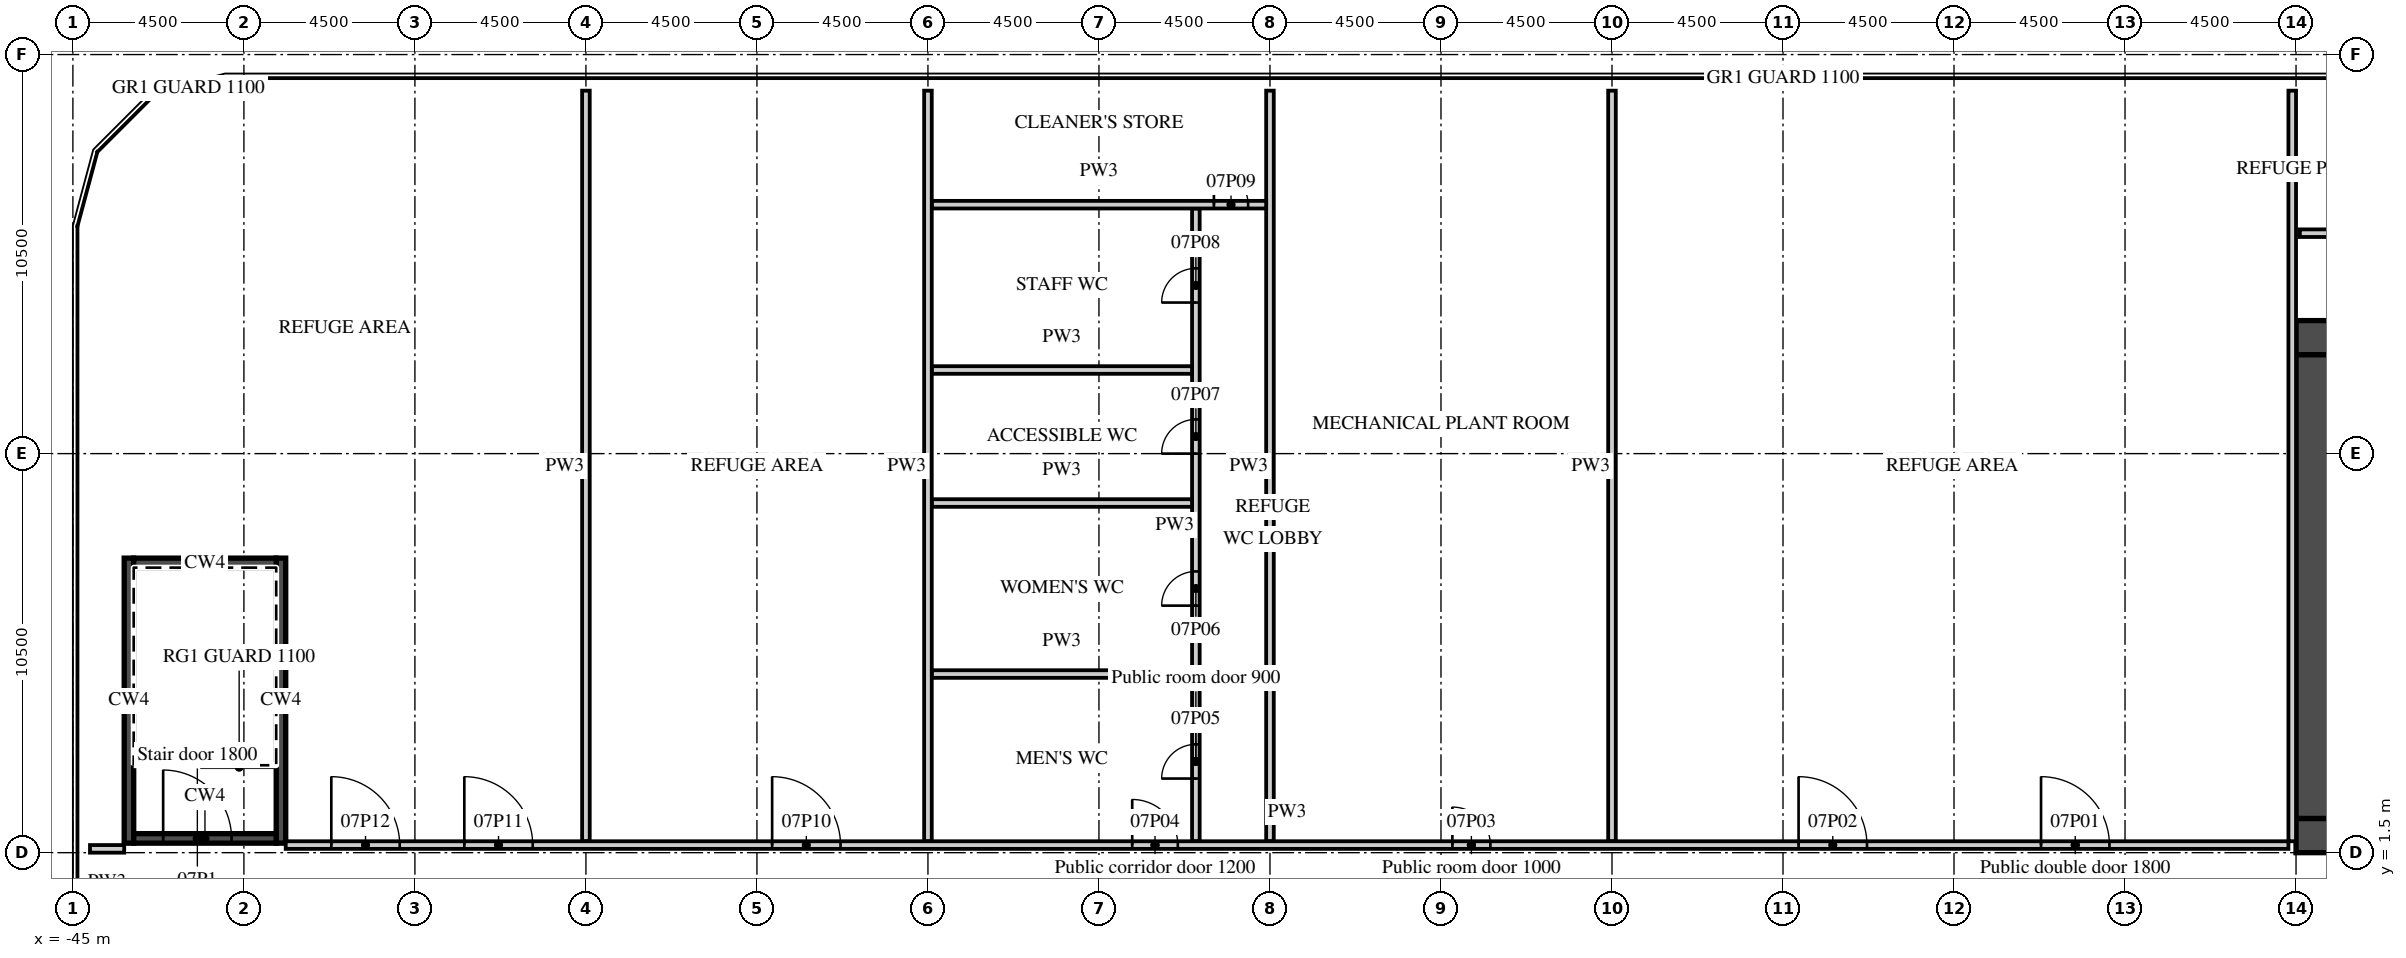
"""IFC4 building model, lengths in metres.
Left out: names, types, materials, properties, quantities, classifications, styles, units other than length and angle.
Written with IfcOpenShell. Run it as: python <this file> out.ifc"""

import sys

from ifc_helpers import new_model, si_unit, direction, frame, frame_2d, origin, place, context, subcontext, project, spatial, rectangle, extrude, element, fill, save


model = new_model("IFC4")
c1 = context("Model", 3, precision=1e-05, world=origin(), true_north=direction((0.0, 1.0)))
c2 = subcontext(c1, "Body", "Model", "MODEL_VIEW")
j1 = project(units=[si_unit("LENGTHUNIT", "METRE"), si_unit("PLANEANGLEUNIT", "RADIAN")], contexts=[c1])
p1 = place(None, origin())
s1 = spatial("IfcSite", under=j1, at=p1, CompositionType="ELEMENT")
p2 = place(p1, origin())
s2 = spatial("IfcBuilding", under=s1, at=p2, CompositionType="ELEMENT")
p3 = place(p2, frame((0.0, 0.0, 47.0)))
s3 = spatial("IfcBuildingStorey", under=s2, at=p3, CompositionType="ELEMENT", Elevation=47.0)
p4 = place(p3, frame((13.5, 1.95, 0.0), z_axis=(0.0, 0.0, 1.0), x_axis=(1.0, 0.0, 0.0)))
e1 = element("IfcWall", 1, at=p4, inside=s3, PredefinedType="SHEAR", context=c2, shape_type="SweptSolid", body=[
    extrude(rectangle(XDim=18.0, YDim=0.9, at=frame_2d((9.0, 0.0))), origin(), (0.0, 0.0, 1.0), 5.6),
])
p5 = place(p4, frame((1.475, 0.0, 0.0)))
e2 = element("IfcOpeningElement", 2, at=p5, cuts=e1, PredefinedType="OPENING", context=c2, shape_type="SweptSolid", body=[
    extrude(rectangle(XDim=1.8, YDim=2.1, at=frame_2d((0.9, 1.05))), frame((0.0, 0.46, 0.0), z_axis=(0.0, -1.0, 0.0), x_axis=(1.0, 0.0, 0.0)), (0.0, 0.0, 1.0), 0.92),
])
p6 = place(p3, frame((13.5, 15.05, 0.0), z_axis=(0.0, 0.0, 1.0), x_axis=(1.0, 0.0, 0.0)))
e3 = element("IfcWall", 3, at=p6, inside=s3, PredefinedType="SHEAR", context=c2, shape_type="SweptSolid", body=[
    extrude(rectangle(XDim=6.8, YDim=0.9, at=frame_2d((3.4, 0.0))), origin(), (0.0, 0.0, 1.0), 5.6),
])
p7 = place(p6, frame((4.725, 0.0, 0.0)))
e4 = element("IfcOpeningElement", 4, at=p7, cuts=e3, PredefinedType="OPENING", context=c2, shape_type="SweptSolid", body=[
    extrude(rectangle(XDim=1.2, YDim=2.1, at=frame_2d((0.6, 1.05))), frame((0.0, 0.46, 0.0), z_axis=(0.0, -1.0, 0.0), x_axis=(1.0, 0.0, 0.0)), (0.0, 0.0, 1.0), 0.92),
])
p8 = place(p3, frame((13.95, 2.4, 0.0), z_axis=(0.0, 0.0, 1.0), x_axis=(0.0, 1.0, 0.0)))
e5 = element("IfcWall", 5, at=p8, inside=s3, PredefinedType="SHEAR", context=c2, shape_type="SweptSolid", body=[
    extrude(rectangle(XDim=12.2, YDim=0.9, at=frame_2d((6.1, 0.0))), origin(), (0.0, 0.0, 1.0), 5.6),
])
p9 = place(p3, frame((13.6, 17.8, 0.0), z_axis=(0.0, 0.0, 1.0), x_axis=(1.0, 0.0, 0.0)))
e6 = element("IfcWall", 6, at=p9, inside=s3, PredefinedType="PARTITIONING", context=c2, shape_type="SweptSolid", body=[
    extrude(rectangle(XDim=30.95, YDim=0.2, at=frame_2d((15.475, 0.0))), origin(), (0.0, 0.0, 1.0), 5.6),
])
p10 = place(p9, frame((15.012, 0.0, 0.0)))
e7 = element("IfcOpeningElement", 7, at=p10, cuts=e6, PredefinedType="OPENING", context=c2, shape_type="SweptSolid", body=[
    extrude(rectangle(XDim=0.9, YDim=2.1, at=frame_2d((0.45, 1.05))), frame((0.0, 0.11, 0.0), z_axis=(0.0, -1.0, 0.0), x_axis=(1.0, 0.0, 0.0)), (0.0, 0.0, 1.0), 0.22),
])
p11 = place(p9, frame((6.712, 0.0, 0.0)))
e8 = element("IfcOpeningElement", 8, at=p11, cuts=e6, PredefinedType="OPENING", context=c2, shape_type="SweptSolid", body=[
    extrude(rectangle(XDim=0.9, YDim=2.1, at=frame_2d((0.45, 1.05))), frame((0.0, 0.11, 0.0), z_axis=(0.0, -1.0, 0.0), x_axis=(1.0, 0.0, 0.0)), (0.0, 0.0, 1.0), 0.22),
])
for number, where, z_axis, x_axis in (
    (9, (-43.525, 1.75, 0.0), (0.0, 0.0, 1.0), (0.0, 1.0, 0.0)),
    (10, (-39.525, 1.75, 0.0), (0.0, 0.0, 1.0), (0.0, 1.0, 0.0)),
):
    element("IfcWall", number, at=place(p3, frame(where, z_axis=z_axis, x_axis=x_axis)), inside=s3, PredefinedType="SHEAR", context=c2, shape_type="SweptSolid", body=[
        extrude(rectangle(XDim=7.5, YDim=0.25, at=frame_2d((3.75, 0.0))), origin(), (0.0, 0.0, 1.0), 5.6),
    ])
p12 = place(p3, frame((-43.4, 9.125, 0.0), z_axis=(0.0, 0.0, 1.0), x_axis=(1.0, 0.0, 0.0)))
e11 = element("IfcWall", 11, at=p12, inside=s3, PredefinedType="SHEAR", context=c2, shape_type="SweptSolid", body=[
    extrude(rectangle(XDim=3.75, YDim=0.25, at=frame_2d((1.875, 0.0))), origin(), (0.0, 0.0, 1.0), 5.6),
])
p13 = place(p3, frame((-43.4, 1.875, 0.0), z_axis=(0.0, 0.0, 1.0), x_axis=(1.0, 0.0, 0.0)))
e12 = element("IfcWall", 12, at=p13, inside=s3, PredefinedType="SHEAR", context=c2, shape_type="SweptSolid", body=[
    extrude(rectangle(XDim=3.75, YDim=0.25, at=frame_2d((1.875, 0.0))), origin(), (0.0, 0.0, 1.0), 5.6),
])
p14 = place(p13, frame((0.775, 0.0, 0.0)))
e13 = element("IfcOpeningElement", 13, at=p14, cuts=e12, PredefinedType="OPENING", context=c2, shape_type="SweptSolid", body=[
    extrude(rectangle(XDim=1.8, YDim=2.1, at=frame_2d((0.9, 1.05))), frame((0.0, 0.135, 0.0), z_axis=(0.0, -1.0, 0.0), x_axis=(1.0, 0.0, 0.0)), (0.0, 0.0, 1.0), 0.27),
])
for number, where, z_axis, x_axis in (
    (14, (-4.5, 1.8, 0.0), (0.0, 0.0, 1.0), (0.0, 1.0, 0.0)),
    (15, (-13.5, 1.8, 0.0), (0.0, 0.0, 1.0), (0.0, 1.0, 0.0)),
):
    element("IfcWall", number, at=place(p3, frame(where, z_axis=z_axis, x_axis=x_axis)), inside=s3, PredefinedType="PARTITIONING", context=c2, shape_type="SweptSolid", body=[
        extrude(rectangle(XDim=19.75, YDim=0.2, at=frame_2d((9.875, 0.0))), origin(), (0.0, 0.0, 1.0), 5.6),
    ])
p15 = place(p3, frame((-15.45, 1.8, 0.0), z_axis=(0.0, 0.0, 1.0), x_axis=(0.0, 1.0, 0.0)))
e16 = element("IfcWall", 16, at=p15, inside=s3, PredefinedType="PARTITIONING", context=c2, shape_type="SweptSolid", body=[
    extrude(rectangle(XDim=16.65, YDim=0.2, at=frame_2d((8.325, 0.0))), origin(), (0.0, 0.0, 1.0), 5.6),
])
p16 = place(p15, frame((1.65, 0.0, 0.0)))
e17 = element("IfcOpeningElement", 17, at=p16, cuts=e16, PredefinedType="OPENING", context=c2, shape_type="SweptSolid", body=[
    extrude(rectangle(XDim=0.9, YDim=2.1, at=frame_2d((0.45, 1.05))), frame((0.0, 0.11, 0.0), z_axis=(0.0, -1.0, 0.0), x_axis=(1.0, 0.0, 0.0)), (0.0, 0.0, 1.0), 0.22),
])
p17 = place(p15, frame((6.2, 0.0, 0.0)))
e18 = element("IfcOpeningElement", 18, at=p17, cuts=e16, PredefinedType="OPENING", context=c2, shape_type="SweptSolid", body=[
    extrude(rectangle(XDim=0.9, YDim=2.1, at=frame_2d((0.45, 1.05))), frame((0.0, 0.11, 0.0), z_axis=(0.0, -1.0, 0.0), x_axis=(1.0, 0.0, 0.0)), (0.0, 0.0, 1.0), 0.22),
])
p18 = place(p15, frame((10.2, 0.0, 0.0)))
e19 = element("IfcOpeningElement", 19, at=p18, cuts=e16, PredefinedType="OPENING", context=c2, shape_type="SweptSolid", body=[
    extrude(rectangle(XDim=0.9, YDim=2.1, at=frame_2d((0.45, 1.05))), frame((0.0, 0.11, 0.0), z_axis=(0.0, -1.0, 0.0), x_axis=(1.0, 0.0, 0.0)), (0.0, 0.0, 1.0), 0.22),
])
p19 = place(p15, frame((14.175, 0.0, 0.0)))
e20 = element("IfcOpeningElement", 20, at=p19, cuts=e16, PredefinedType="OPENING", context=c2, shape_type="SweptSolid", body=[
    extrude(rectangle(XDim=0.9, YDim=2.1, at=frame_2d((0.45, 1.05))), frame((0.0, 0.11, 0.0), z_axis=(0.0, -1.0, 0.0), x_axis=(1.0, 0.0, 0.0)), (0.0, 0.0, 1.0), 0.22),
])
for number, where, z_axis, x_axis in (
    (21, (-22.4, 6.2, 0.0), (0.0, 0.0, 1.0), (1.0, 0.0, 0.0)),
    (22, (-22.4, 10.7, 0.0), (0.0, 0.0, 1.0), (1.0, 0.0, 0.0)),
    (23, (-22.4, 14.2, 0.0), (0.0, 0.0, 1.0), (1.0, 0.0, 0.0)),
):
    element("IfcWall", number, at=place(p3, frame(where, z_axis=z_axis, x_axis=x_axis)), inside=s3, PredefinedType="PARTITIONING", context=c2, shape_type="SweptSolid", body=[
        extrude(rectangle(XDim=6.85, YDim=0.2, at=frame_2d((3.425, 0.0))), origin(), (0.0, 0.0, 1.0), 5.6),
    ])
p20 = place(p3, frame((-22.4, 18.55, 0.0), z_axis=(0.0, 0.0, 1.0), x_axis=(1.0, 0.0, 0.0)))
e24 = element("IfcWall", 24, at=p20, inside=s3, PredefinedType="PARTITIONING", context=c2, shape_type="SweptSolid", body=[
    extrude(rectangle(XDim=8.8, YDim=0.2, at=frame_2d((4.4, 0.0))), origin(), (0.0, 0.0, 1.0), 5.6),
])
p21 = place(p20, frame((7.425, 0.0, 0.0)))
e25 = element("IfcOpeningElement", 25, at=p21, cuts=e24, PredefinedType="OPENING", context=c2, shape_type="SweptSolid", body=[
    extrude(rectangle(XDim=0.9, YDim=2.1, at=frame_2d((0.45, 1.05))), frame((0.0, 0.11, 0.0), z_axis=(0.0, -1.0, 0.0), x_axis=(1.0, 0.0, 0.0)), (0.0, 0.0, 1.0), 0.22),
])
for number, where, z_axis, x_axis in (
    (26, (-22.5, 1.8, 0.0), (0.0, 0.0, 1.0), (0.0, 1.0, 0.0)),
    (27, (-31.5, 1.8, 0.0), (0.0, 0.0, 1.0), (0.0, 1.0, 0.0)),
):
    element("IfcWall", number, at=place(p3, frame(where, z_axis=z_axis, x_axis=x_axis)), inside=s3, PredefinedType="PARTITIONING", context=c2, shape_type="SweptSolid", body=[
        extrude(rectangle(XDim=19.75, YDim=0.2, at=frame_2d((9.875, 0.0))), origin(), (0.0, 0.0, 1.0), 5.6),
    ])
p22 = place(p3, frame((-39.4, 1.7, 0.0), z_axis=(0.0, 0.0, 1.0), x_axis=(1.0, 0.0, 0.0)))
e28 = element("IfcWall", 28, at=p22, inside=s3, PredefinedType="PARTITIONING", context=c2, shape_type="SweptSolid", body=[
    extrude(rectangle(XDim=52.7, YDim=0.2, at=frame_2d((26.35, 0.0))), origin(), (0.0, 0.0, 1.0), 5.6),
])
p23 = place(p22, frame((46.19, 0.0, 0.0)))
e29 = element("IfcOpeningElement", 29, at=p23, cuts=e28, PredefinedType="OPENING", context=c2, shape_type="SweptSolid", body=[
    extrude(rectangle(XDim=1.8, YDim=2.1, at=frame_2d((0.9, 1.05))), frame((0.0, 0.11, 0.0), z_axis=(0.0, -1.0, 0.0), x_axis=(1.0, 0.0, 0.0)), (0.0, 0.0, 1.0), 0.22),
])
p24 = place(p22, frame((39.81, 0.0, 0.0)))
e30 = element("IfcOpeningElement", 30, at=p24, cuts=e28, PredefinedType="OPENING", context=c2, shape_type="SweptSolid", body=[
    extrude(rectangle(XDim=1.8, YDim=2.1, at=frame_2d((0.9, 1.05))), frame((0.0, 0.11, 0.0), z_axis=(0.0, -1.0, 0.0), x_axis=(1.0, 0.0, 0.0)), (0.0, 0.0, 1.0), 0.22),
])
p25 = place(p22, frame((30.7, 0.0, 0.0)))
e31 = element("IfcOpeningElement", 31, at=p25, cuts=e28, PredefinedType="OPENING", context=c2, shape_type="SweptSolid", body=[
    extrude(rectangle(XDim=1.0, YDim=2.1, at=frame_2d((0.5, 1.05))), frame((0.0, 0.11, 0.0), z_axis=(0.0, -1.0, 0.0), x_axis=(1.0, 0.0, 0.0)), (0.0, 0.0, 1.0), 0.22),
])
p26 = place(p22, frame((22.275, 0.0, 0.0)))
e32 = element("IfcOpeningElement", 32, at=p26, cuts=e28, PredefinedType="OPENING", context=c2, shape_type="SweptSolid", body=[
    extrude(rectangle(XDim=1.2, YDim=2.1, at=frame_2d((0.6, 1.05))), frame((0.0, 0.11, 0.0), z_axis=(0.0, -1.0, 0.0), x_axis=(1.0, 0.0, 0.0)), (0.0, 0.0, 1.0), 0.22),
])
p27 = place(p22, frame((12.8, 0.0, 0.0)))
e33 = element("IfcOpeningElement", 33, at=p27, cuts=e28, PredefinedType="OPENING", context=c2, shape_type="SweptSolid", body=[
    extrude(rectangle(XDim=1.8, YDim=2.1, at=frame_2d((0.9, 1.05))), frame((0.0, 0.11, 0.0), z_axis=(0.0, -1.0, 0.0), x_axis=(1.0, 0.0, 0.0)), (0.0, 0.0, 1.0), 0.22),
])
p28 = place(p22, frame((4.7, 0.0, 0.0)))
e34 = element("IfcOpeningElement", 34, at=p28, cuts=e28, PredefinedType="OPENING", context=c2, shape_type="SweptSolid", body=[
    extrude(rectangle(XDim=1.8, YDim=2.1, at=frame_2d((0.9, 1.05))), frame((0.0, 0.11, 0.0), z_axis=(0.0, -1.0, 0.0), x_axis=(1.0, 0.0, 0.0)), (0.0, 0.0, 1.0), 0.22),
])
p29 = place(p22, frame((1.2, 0.0, 0.0)))
e35 = element("IfcOpeningElement", 35, at=p29, cuts=e28, PredefinedType="OPENING", context=c2, shape_type="SweptSolid", body=[
    extrude(rectangle(XDim=1.8, YDim=2.1, at=frame_2d((0.9, 1.05))), frame((0.0, 0.11, 0.0), z_axis=(0.0, -1.0, 0.0), x_axis=(1.0, 0.0, 0.0)), (0.0, 0.0, 1.0), 0.22),
])
p30 = place(p3, frame((-44.55, 1.6, 0.0), z_axis=(0.0, 0.0, 1.0), x_axis=(1.0, 0.0, 0.0)))
e36 = element("IfcWall", 36, at=p30, inside=s3, PredefinedType="PARTITIONING", context=c2, shape_type="SweptSolid", body=[
    extrude(rectangle(XDim=0.9, YDim=0.2, at=frame_2d((0.45, 0.0))), origin(), (0.0, 0.0, 1.0), 5.6),
])
p31 = place(p3, frame((13.4, 1.8, 0.0), z_axis=(0.0, 0.0, 1.0), x_axis=(0.0, 1.0, 0.0)))
e37 = element("IfcWall", 37, at=p31, inside=s3, PredefinedType="PARTITIONING", context=c2, shape_type="SweptSolid", body=[
    extrude(rectangle(XDim=19.75, YDim=0.2, at=frame_2d((9.875, 0.0))), origin(), (0.0, 0.0, 1.0), 5.6),
])
p32 = place(p14, origin())
e38 = element("IfcDoor", 38, at=p32, inside=s3, OperationType="DOUBLE_DOOR_DOUBLE_SWING", PredefinedType="DOOR", context=c2, shape_type="SweptSolid", body=[
    extrude(rectangle(XDim=1.8, YDim=2.1, at=frame_2d((0.9, 1.05))), frame((0.0, 0.025, 0.0), z_axis=(0.0, -1.0, 0.0), x_axis=(1.0, 0.0, 0.0)), (0.0, 0.0, 1.0), 0.05),
])
fill(e13, e38)
p33 = place(p23, origin())
e39 = element("IfcDoor", 39, at=p33, inside=s3, OperationType="DOUBLE_DOOR_DOUBLE_SWING", PredefinedType="DOOR", context=c2, shape_type="SweptSolid", body=[
    extrude(rectangle(XDim=1.8, YDim=2.1, at=frame_2d((0.9, 1.05))), frame((0.0, 0.025, 0.0), z_axis=(0.0, -1.0, 0.0), x_axis=(1.0, 0.0, 0.0)), (0.0, 0.0, 1.0), 0.05),
])
fill(e29, e39)
p34 = place(p24, origin())
e40 = element("IfcDoor", 40, at=p34, inside=s3, OperationType="DOUBLE_DOOR_DOUBLE_SWING", PredefinedType="DOOR", context=c2, shape_type="SweptSolid", body=[
    extrude(rectangle(XDim=1.8, YDim=2.1, at=frame_2d((0.9, 1.05))), frame((0.0, 0.025, 0.0), z_axis=(0.0, -1.0, 0.0), x_axis=(1.0, 0.0, 0.0)), (0.0, 0.0, 1.0), 0.05),
])
fill(e30, e40)
p35 = place(p25, origin())
e41 = element("IfcDoor", 41, at=p35, inside=s3, OperationType="SINGLE_SWING_LEFT", PredefinedType="DOOR", context=c2, shape_type="SweptSolid", body=[
    extrude(rectangle(XDim=1.0, YDim=2.1, at=frame_2d((0.5, 1.05))), frame((0.0, 0.025, 0.0), z_axis=(0.0, -1.0, 0.0), x_axis=(1.0, 0.0, 0.0)), (0.0, 0.0, 1.0), 0.05),
])
fill(e31, e41)
p36 = place(p26, origin())
e42 = element("IfcDoor", 42, at=p36, inside=s3, OperationType="SINGLE_SWING_LEFT", PredefinedType="DOOR", context=c2, shape_type="SweptSolid", body=[
    extrude(rectangle(XDim=1.2, YDim=2.1, at=frame_2d((0.6, 1.05))), frame((0.0, 0.025, 0.0), z_axis=(0.0, -1.0, 0.0), x_axis=(1.0, 0.0, 0.0)), (0.0, 0.0, 1.0), 0.05),
])
fill(e32, e42)
p37 = place(p16, origin())
e43 = element("IfcDoor", 43, at=p37, inside=s3, OperationType="SINGLE_SWING_LEFT", PredefinedType="DOOR", context=c2, shape_type="SweptSolid", body=[
    extrude(rectangle(XDim=0.9, YDim=2.1, at=frame_2d((0.45, 1.05))), frame((0.0, 0.025, 0.0), z_axis=(0.0, -1.0, 0.0), x_axis=(1.0, 0.0, 0.0)), (0.0, 0.0, 1.0), 0.05),
])
fill(e17, e43)
p38 = place(p17, origin())
e44 = element("IfcDoor", 44, at=p38, inside=s3, OperationType="SINGLE_SWING_LEFT", PredefinedType="DOOR", context=c2, shape_type="SweptSolid", body=[
    extrude(rectangle(XDim=0.9, YDim=2.1, at=frame_2d((0.45, 1.05))), frame((0.0, 0.025, 0.0), z_axis=(0.0, -1.0, 0.0), x_axis=(1.0, 0.0, 0.0)), (0.0, 0.0, 1.0), 0.05),
])
fill(e18, e44)
p39 = place(p18, origin())
e45 = element("IfcDoor", 45, at=p39, inside=s3, OperationType="SINGLE_SWING_LEFT", PredefinedType="DOOR", context=c2, shape_type="SweptSolid", body=[
    extrude(rectangle(XDim=0.9, YDim=2.1, at=frame_2d((0.45, 1.05))), frame((0.0, 0.025, 0.0), z_axis=(0.0, -1.0, 0.0), x_axis=(1.0, 0.0, 0.0)), (0.0, 0.0, 1.0), 0.05),
])
fill(e19, e45)
p40 = place(p19, origin())
e46 = element("IfcDoor", 46, at=p40, inside=s3, OperationType="SINGLE_SWING_LEFT", PredefinedType="DOOR", context=c2, shape_type="SweptSolid", body=[
    extrude(rectangle(XDim=0.9, YDim=2.1, at=frame_2d((0.45, 1.05))), frame((0.0, 0.025, 0.0), z_axis=(0.0, -1.0, 0.0), x_axis=(1.0, 0.0, 0.0)), (0.0, 0.0, 1.0), 0.05),
])
fill(e20, e46)
p41 = place(p21, origin())
e47 = element("IfcDoor", 47, at=p41, inside=s3, OperationType="SINGLE_SWING_LEFT", PredefinedType="DOOR", context=c2, shape_type="SweptSolid", body=[
    extrude(rectangle(XDim=0.9, YDim=2.1, at=frame_2d((0.45, 1.05))), frame((0.0, 0.025, 0.0), z_axis=(0.0, -1.0, 0.0), x_axis=(1.0, 0.0, 0.0)), (0.0, 0.0, 1.0), 0.05),
])
fill(e25, e47)
p42 = place(p27, origin())
e48 = element("IfcDoor", 48, at=p42, inside=s3, OperationType="DOUBLE_DOOR_DOUBLE_SWING", PredefinedType="DOOR", context=c2, shape_type="SweptSolid", body=[
    extrude(rectangle(XDim=1.8, YDim=2.1, at=frame_2d((0.9, 1.05))), frame((0.0, 0.025, 0.0), z_axis=(0.0, -1.0, 0.0), x_axis=(1.0, 0.0, 0.0)), (0.0, 0.0, 1.0), 0.05),
])
fill(e33, e48)
p43 = place(p28, origin())
e49 = element("IfcDoor", 49, at=p43, inside=s3, OperationType="DOUBLE_DOOR_DOUBLE_SWING", PredefinedType="DOOR", context=c2, shape_type="SweptSolid", body=[
    extrude(rectangle(XDim=1.8, YDim=2.1, at=frame_2d((0.9, 1.05))), frame((0.0, 0.025, 0.0), z_axis=(0.0, -1.0, 0.0), x_axis=(1.0, 0.0, 0.0)), (0.0, 0.0, 1.0), 0.05),
])
fill(e34, e49)
p44 = place(p29, origin())
e50 = element("IfcDoor", 50, at=p44, inside=s3, OperationType="DOUBLE_DOOR_DOUBLE_SWING", PredefinedType="DOOR", context=c2, shape_type="SweptSolid", body=[
    extrude(rectangle(XDim=1.8, YDim=2.1, at=frame_2d((0.9, 1.05))), frame((0.0, 0.025, 0.0), z_axis=(0.0, -1.0, 0.0), x_axis=(1.0, 0.0, 0.0)), (0.0, 0.0, 1.0), 0.05),
])
fill(e35, e50)
save(model, sys.argv[1])
